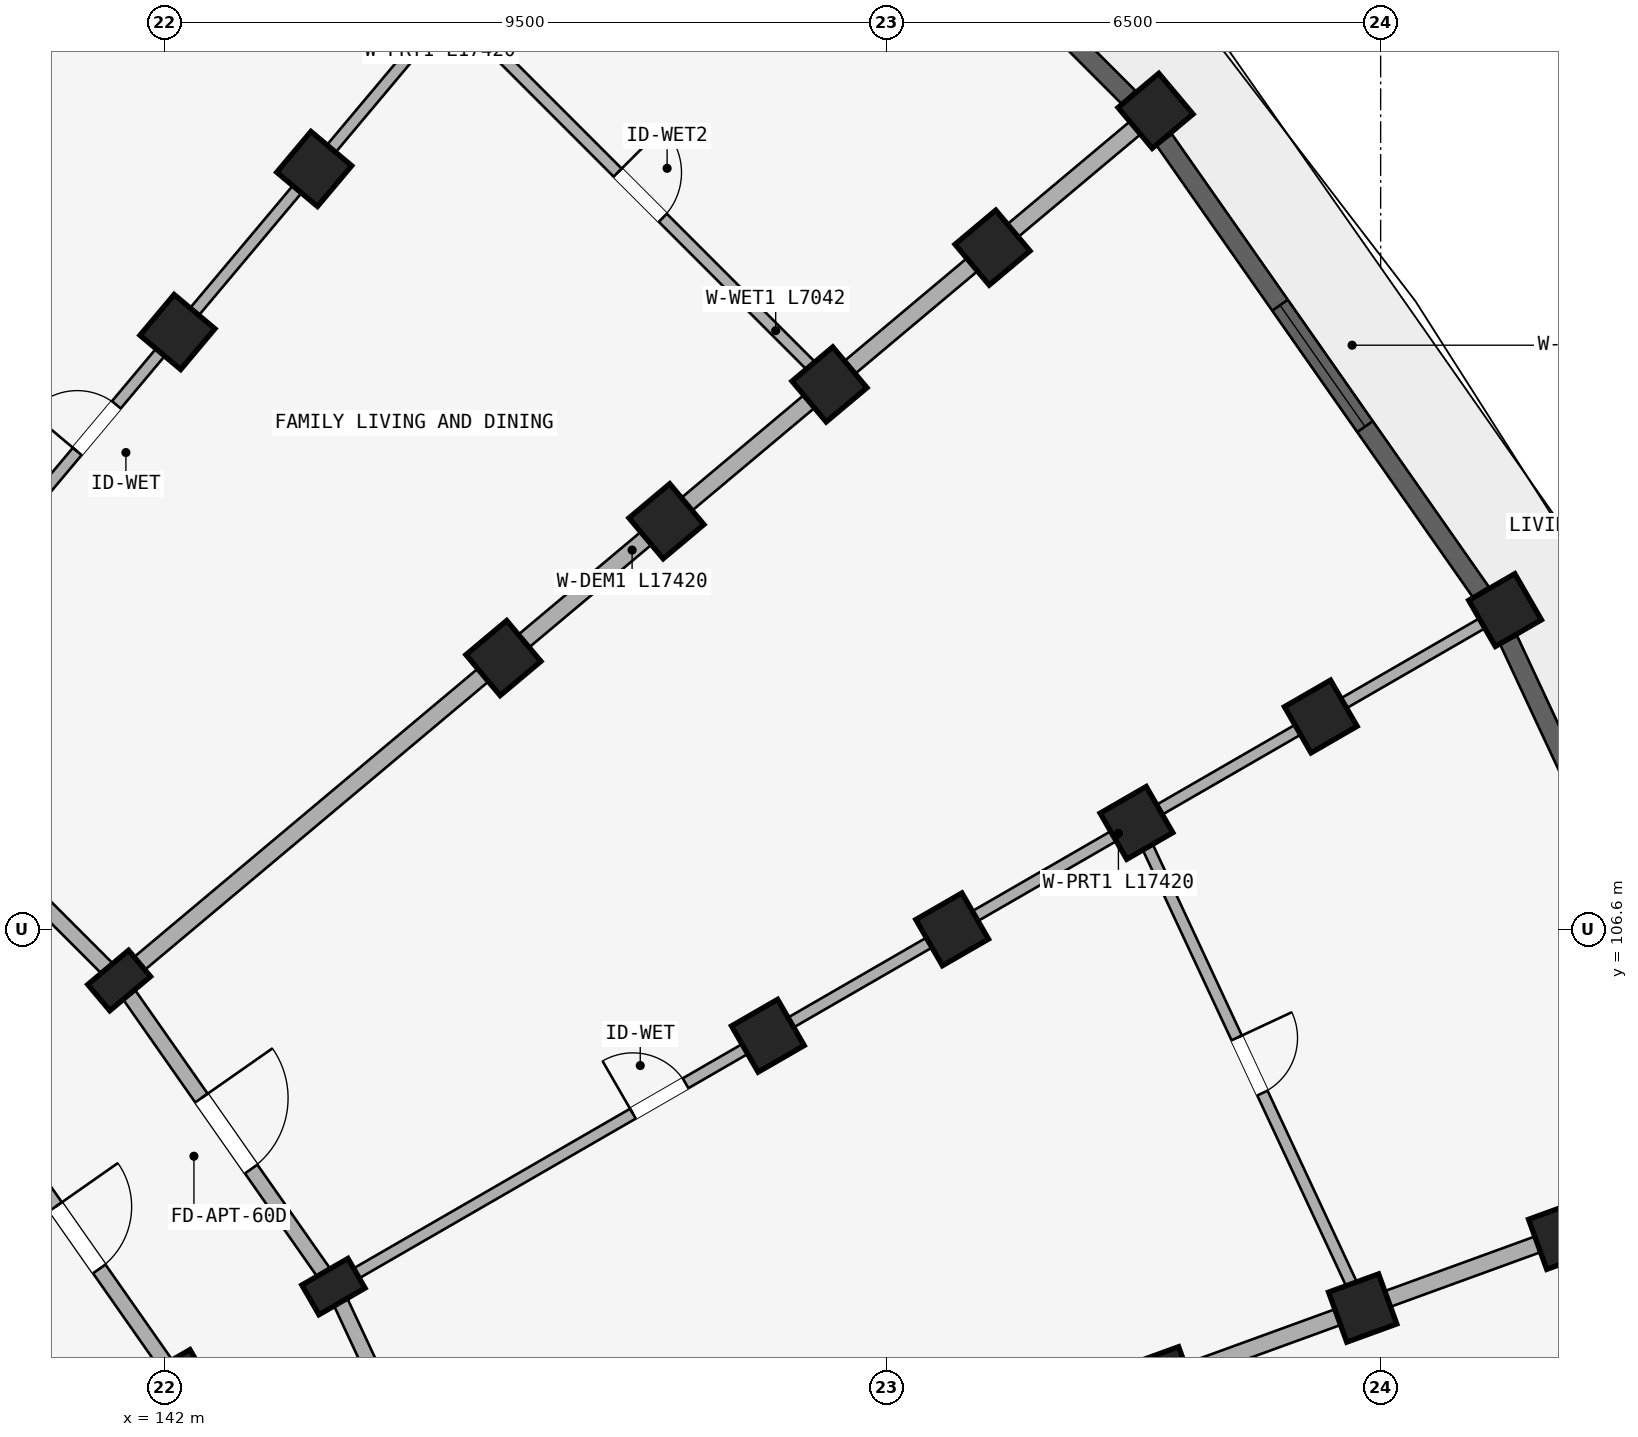
"""IFC4 building model, lengths in metres.
Left out: names, types, materials, properties, quantities, classifications, styles, units other than length and angle.
Written with IfcOpenShell. Run it as: python <this file> out.ifc"""

import sys

from ifc_helpers import new_model, si_unit, direction, frame, frame_2d, origin, origin_2d, place, context, subcontext, project, spatial, rectangle, extrude, element, fill, save


model = new_model("IFC4")
c1 = context("Model", 3, precision=1e-05, world=origin(), true_north=direction((0.0, 1.0)))
c2 = subcontext(c1, "Body", "Model", "MODEL_VIEW")
j1 = project(units=[si_unit("LENGTHUNIT", "METRE"), si_unit("PLANEANGLEUNIT", "RADIAN")], contexts=[c1])
p1 = place(None, origin())
s1 = spatial("IfcSite", under=j1, at=p1, CompositionType="ELEMENT")
p2 = place(p1, origin())
s2 = spatial("IfcBuilding", under=s1, at=p2, CompositionType="ELEMENT")
p3 = place(p2, frame((0.0, 0.0, 21.3)))
s3 = spatial("IfcBuildingStorey", under=s2, at=p3, CompositionType="ELEMENT", Elevation=21.3)
for number, where, z_axis, x_axis in (
    (1, (142.169, 114.458, 0.0), (0.0, 0.0, 1.0), (-0.766, 0.643, 0.0)),
    (2, (143.969, 116.603, 0.0), (0.0, 0.0, 1.0), (-0.766, 0.643, 0.0)),
):
    element("IfcColumn", number, at=place(p3, frame(where, z_axis=z_axis, x_axis=x_axis)), inside=s3, PredefinedType="COLUMN", context=c2, shape_type="SweptSolid", body=[
        extrude(rectangle(XDim=0.7, YDim=0.7, at=origin_2d()), origin(), (0.0, 0.0, 1.0), 2.93),
    ])
p4 = place(p3, frame((141.402, 105.927, 0.0), z_axis=(0.0, 0.0, 1.0), x_axis=(-0.642787609687, 0.766044443119, 0.0)))
e3 = element("IfcColumn", 3, at=p4, inside=s3, PredefinedType="COLUMN", context=c2, shape_type="SweptSolid", body=[
    extrude(rectangle(XDim=0.45, YDim=0.7, at=origin_2d()), origin(), (0.0, 0.0, 1.0), 2.93),
])
for number, where, z_axis, x_axis in (
    (4, (146.458, 110.169, 0.0), (0.0, 0.0, 1.0), (-0.643, 0.766, 0.0)),
    (5, (148.603, 111.969, 0.0), (0.0, 0.0, 1.0), (-0.643, 0.766, 0.0)),
    (6, (150.748, 113.769, 0.0), (0.0, 0.0, 1.0), (-0.643, 0.766, 0.0)),
    (7, (152.893, 115.568, 0.0), (0.0, 0.0, 1.0), (-0.643, 0.766, 0.0)),
    (8, (155.038, 117.368, 0.0), (0.0, 0.0, 1.0), (-0.643, 0.766, 0.0)),
):
    element("IfcColumn", number, at=place(p3, frame(where, z_axis=z_axis, x_axis=x_axis)), inside=s3, PredefinedType="COLUMN", context=c2, shape_type="SweptSolid", body=[
        extrude(rectangle(XDim=0.7, YDim=0.7, at=origin_2d()), origin(), (0.0, 0.0, 1.0), 2.93),
    ])
for number, where, z_axis, x_axis in (
    (9, (142.144, 100.7, 0.0), (0.0, 0.0, 1.0), (-0.5, 0.866, 0.0)),
    (10, (144.222, 101.9, 0.0), (0.0, 0.0, 1.0), (-0.5, 0.866, 0.0)),
):
    element("IfcColumn", number, at=place(p3, frame(where, z_axis=z_axis, x_axis=x_axis)), inside=s3, PredefinedType="COLUMN", context=c2, shape_type="SweptSolid", body=[
        extrude(rectangle(XDim=0.45, YDim=0.7, at=origin_2d()), origin(), (0.0, 0.0, 1.0), 2.93),
    ])
for number, where, z_axis, x_axis in (
    (11, (149.938, 105.2, 0.0), (0.0, 0.0, 1.0), (-0.5, 0.866, 0.0)),
    (12, (152.363, 106.6, 0.0), (0.0, 0.0, 1.0), (-0.5, 0.866, 0.0)),
    (13, (154.787, 108.0, 0.0), (0.0, 0.0, 1.0), (-0.5, 0.866, 0.0)),
    (14, (157.212, 109.4, 0.0), (0.0, 0.0, 1.0), (-0.5, 0.866, 0.0)),
    (15, (159.637, 110.8, 0.0), (0.0, 0.0, 1.0), (-0.5, 0.866, 0.0)),
    (16, (155.132, 100.66, 0.0), (0.0, 0.0, 1.0), (-0.342, 0.94, 0.0)),
    (17, (157.764, 101.618, 0.0), (0.0, 0.0, 1.0), (-0.342, 0.94, 0.0)),
    (18, (160.395, 102.575, 0.0), (0.0, 0.0, 1.0), (-0.342, 0.94, 0.0)),
):
    element("IfcColumn", number, at=place(p3, frame(where, z_axis=z_axis, x_axis=x_axis)), inside=s3, PredefinedType="COLUMN", context=c2, shape_type="SweptSolid", body=[
        extrude(rectangle(XDim=0.7, YDim=0.7, at=origin_2d()), origin(), (0.0, 0.0, 1.0), 2.93),
    ])
p5 = place(p3, frame((137.927, 109.402, 0.0), z_axis=(0.0, 0.0, 1.0), x_axis=(0.707106781187, -0.707106781187, 0.0)))
e19 = element("IfcWall", 19, at=p5, inside=s3, PredefinedType="STANDARD", context=c2, shape_type="SweptSolid", body=[
    extrude(rectangle(XDim=4.916, YDim=0.2, at=frame_2d((2.458, 0.0))), origin(), (0.0, 0.0, 1.0), 2.372),
])
p6 = place(p3, frame((139.564, 104.384, 0.0), z_axis=(0.0, 0.0, 1.0), x_axis=(0.573571637217, -0.819155404658, 0.0)))
e20 = element("IfcWall", 20, at=p6, inside=s3, PredefinedType="STANDARD", context=c2, shape_type="SweptSolid", body=[
    extrude(rectangle(XDim=4.497, YDim=0.2, at=frame_2d((2.249, 0.0))), origin(), (0.0, 0.0, 1.0), 2.372),
])
p7 = place(p6, frame((1.749, 0.0, 0.0)))
e21 = element("IfcOpeningElement", 21, at=p7, cuts=e20, PredefinedType="OPENING", context=c2, shape_type="SweptSolid", body=[
    extrude(rectangle(XDim=1.0, YDim=2.15, at=frame_2d((0.5, 1.075))), frame((0.0, 0.11, 0.0), z_axis=(0.0, -1.0, 0.0), x_axis=(1.0, 0.0, 0.0)), (0.0, 0.0, 1.0), 0.22),
])
p8 = place(p3, frame((141.402, 105.927, 0.0), z_axis=(0.0, 0.0, 1.0), x_axis=(0.573592335331, -0.819140911474, 0.0)))
e22 = element("IfcWall", 22, at=p8, inside=s3, PredefinedType="STANDARD", context=c2, shape_type="SweptSolid", body=[
    extrude(rectangle(XDim=4.916, YDim=0.2, at=frame_2d((2.458, 0.0))), origin(), (0.0, 0.0, 1.0), 2.372),
])
p9 = place(p8, frame((1.888, 0.0, 0.0)))
e23 = element("IfcOpeningElement", 23, at=p9, cuts=e22, PredefinedType="OPENING", context=c2, shape_type="SweptSolid", body=[
    extrude(rectangle(XDim=1.14, YDim=2.15, at=frame_2d((0.57, 1.075))), frame((0.0, 0.11, 0.0), z_axis=(0.0, -1.0, 0.0), x_axis=(1.0, 0.0, 0.0)), (0.0, 0.0, 1.0), 0.22),
])
p10 = place(p3, frame((144.222, 101.9, 0.0), z_axis=(0.0, 0.0, 1.0), x_axis=(0.422629854778, -0.906302381024, 0.0)))
e24 = element("IfcWall", 24, at=p10, inside=s3, PredefinedType="STANDARD", context=c2, shape_type="SweptSolid", body=[
    extrude(rectangle(XDim=4.915, YDim=0.2, at=frame_2d((2.458, 0.0))), origin(), (0.0, 0.0, 1.0), 2.372),
])
p11 = place(p3, frame((133.95, 112.309, 0.0), z_axis=(0.0, 0.0, 1.0), x_axis=(0.499997843263, 0.866026648973, 0.0)))
e25 = element("IfcWall", 25, at=p11, inside=s3, PredefinedType="STANDARD", context=c2, shape_type="SweptSolid", body=[
    extrude(rectangle(XDim=17.42, YDim=0.22, at=frame_2d((8.71, 0.0))), origin(), (0.0, 0.0, 1.0), 2.372),
])
p12 = place(p3, frame((137.991, 109.479, 0.0), z_axis=(0.0, 0.0, 1.0), x_axis=(0.642784757967, 0.766046835987, 0.0)))
e26 = element("IfcWall", 26, at=p12, inside=s3, PredefinedType="PARTITIONING", context=c2, shape_type="SweptSolid", body=[
    extrude(rectangle(XDim=17.42, YDim=0.15, at=frame_2d((8.71, 0.0))), origin(), (0.0, 0.0, 1.0), 2.372),
])
p13 = place(p12, frame((4.45, 0.0, 0.0)))
e27 = element("IfcOpeningElement", 27, at=p13, cuts=e26, PredefinedType="OPENING", context=c2, shape_type="SweptSolid", body=[
    extrude(rectangle(XDim=0.8, YDim=2.1, at=frame_2d((0.4, 1.05))), frame((0.0, 0.085, 0.0), z_axis=(0.0, -1.0, 0.0), x_axis=(1.0, 0.0, 0.0)), (0.0, 0.0, 1.0), 0.17),
])
p14 = place(p3, frame((141.479, 105.991, 0.0), z_axis=(0.0, 0.0, 1.0), x_axis=(0.766046835987, 0.642784757967, 0.0)))
e28 = element("IfcWall", 28, at=p14, inside=s3, PredefinedType="STANDARD", context=c2, shape_type="SweptSolid", body=[
    extrude(rectangle(XDim=17.42, YDim=0.22, at=frame_2d((8.71, 0.0))), origin(), (0.0, 0.0, 1.0), 2.372),
])
p15 = place(p3, frame((144.309, 101.95, 0.0), z_axis=(0.0, 0.0, 1.0), x_axis=(0.866026648973, 0.499997843263, 0.0)))
e29 = element("IfcWall", 29, at=p15, inside=s3, PredefinedType="PARTITIONING", context=c2, shape_type="SweptSolid", body=[
    extrude(rectangle(XDim=17.42, YDim=0.15, at=frame_2d((8.71, 0.0))), origin(), (0.0, 0.0, 1.0), 2.372),
])
p16 = place(p15, frame((4.45, 0.0, 0.0)))
e30 = element("IfcOpeningElement", 30, at=p16, cuts=e29, PredefinedType="OPENING", context=c2, shape_type="SweptSolid", body=[
    extrude(rectangle(XDim=0.8, YDim=2.1, at=frame_2d((0.4, 1.05))), frame((0.0, 0.085, 0.0), z_axis=(0.0, -1.0, 0.0), x_axis=(1.0, 0.0, 0.0)), (0.0, 0.0, 1.0), 0.17),
])
p17 = place(p3, frame((146.393, 97.479, 0.0), z_axis=(0.0, 0.0, 1.0), x_axis=(0.939691901159, 0.342022120477, 0.0)))
e31 = element("IfcWall", 31, at=p17, inside=s3, PredefinedType="STANDARD", context=c2, shape_type="SweptSolid", body=[
    extrude(rectangle(XDim=17.42, YDim=0.22, at=frame_2d((8.71, 0.0))), origin(), (0.0, 0.0, 1.0), 2.372),
])
p18 = place(p3, frame((145.769, 118.748, 0.0), z_axis=(0.0, 0.0, 1.0), x_axis=(0.707106781187, -0.707106781187, 0.0)))
e32 = element("IfcWall", 32, at=p18, inside=s3, PredefinedType="PLUMBINGWALL", context=c2, shape_type="SweptSolid", body=[
    extrude(rectangle(XDim=7.042, YDim=0.15, at=frame_2d((3.521, 0.0))), origin(), (0.0, 0.0, 1.0), 2.372),
])
p19 = place(p18, frame((3.101, 0.0, 0.0)))
e33 = element("IfcOpeningElement", 33, at=p19, cuts=e32, PredefinedType="OPENING", context=c2, shape_type="SweptSolid", body=[
    extrude(rectangle(XDim=0.84, YDim=2.1, at=frame_2d((0.42, 1.05))), frame((0.0, 0.085, 0.0), z_axis=(0.0, -1.0, 0.0), x_axis=(1.0, 0.0, 0.0)), (0.0, 0.0, 1.0), 0.17),
])
p20 = place(p3, frame((154.787, 108.0, 0.0), z_axis=(0.0, 0.0, 1.0), x_axis=(0.422640621205, -0.906297360311, 0.0)))
e34 = element("IfcWall", 34, at=p20, inside=s3, PredefinedType="PLUMBINGWALL", context=c2, shape_type="SweptSolid", body=[
    extrude(rectangle(XDim=7.042, YDim=0.15, at=frame_2d((3.521, 0.0))), origin(), (0.0, 0.0, 1.0), 2.372),
])
p21 = place(p20, frame((3.121, 0.0, 0.0)))
e35 = element("IfcOpeningElement", 35, at=p21, cuts=e34, PredefinedType="OPENING", context=c2, shape_type="SweptSolid", body=[
    extrude(rectangle(XDim=0.8, YDim=2.1, at=frame_2d((0.4, 1.05))), frame((0.0, 0.085, 0.0), z_axis=(0.0, -1.0, 0.0), x_axis=(1.0, 0.0, 0.0)), (0.0, 0.0, 1.0), 0.17),
])
p22 = place(p3, frame((149.546, 122.684, 0.0), z_axis=(0.0, 0.0, 1.0), x_axis=(0.707106781187, -0.707106781187, 0.0)))
e36 = element("IfcWall", 36, at=p22, inside=s3, PredefinedType="STANDARD", context=c2, shape_type="SweptSolid", body=[
    extrude(rectangle(XDim=7.267, YDim=0.25, at=frame_2d((3.633, 0.0))), origin(), (0.0, 0.0, 1.0), 2.472),
])
p23 = place(p22, frame((4.766, 0.0, 0.472)))
e37 = element("IfcOpeningElement", 37, at=p23, cuts=e36, PredefinedType="OPENING", context=c2, shape_type="SweptSolid", body=[
    extrude(rectangle(XDim=1.2, YDim=1.5, at=frame_2d((0.6, 0.75))), frame((0.0, 0.135, 0.0), z_axis=(0.0, -1.0, 0.0), x_axis=(1.0, 0.0, 0.0)), (0.0, 0.0, 1.0), 0.27),
])
p24 = place(p22, frame((1.883, 0.0, 0.0)))
e38 = element("IfcOpeningElement", 38, at=p24, cuts=e36, PredefinedType="OPENING", context=c2, shape_type="SweptSolid", body=[
    extrude(rectangle(XDim=1.32, YDim=2.15, at=frame_2d((0.66, 1.075))), frame((0.0, 0.135, 0.0), z_axis=(0.0, -1.0, 0.0), x_axis=(1.0, 0.0, 0.0)), (0.0, 0.0, 1.0), 0.27),
])
p25 = place(p3, frame((155.151, 116.989, 0.0), z_axis=(0.0, 0.0, 1.0), x_axis=(0.573566061701, -0.819159308599, 0.0)))
e39 = element("IfcWall", 39, at=p25, inside=s3, PredefinedType="STANDARD", context=c2, shape_type="SweptSolid", body=[
    extrude(rectangle(XDim=7.267, YDim=0.25, at=frame_2d((3.633, 0.0))), origin(), (0.0, 0.0, 1.0), 2.472),
])
p26 = place(p25, frame((2.658, 0.0, 0.422)))
e40 = element("IfcOpeningElement", 40, at=p26, cuts=e39, PredefinedType="OPENING", context=c2, shape_type="SweptSolid", body=[
    extrude(rectangle(XDim=1.95, YDim=1.85, at=frame_2d((0.975, 0.925))), frame((0.0, 0.135, 0.0), z_axis=(0.0, -1.0, 0.0), x_axis=(1.0, 0.0, 0.0)), (0.0, 0.0, 1.0), 0.27),
])
p27 = place(p3, frame((159.683, 110.406, 0.0), z_axis=(0.0, 0.0, 1.0), x_axis=(0.422627946127, -0.90630327107, 0.0)))
e41 = element("IfcWall", 41, at=p27, inside=s3, PredefinedType="STANDARD", context=c2, shape_type="SweptSolid", body=[
    extrude(rectangle(XDim=7.267, YDim=0.25, at=frame_2d((3.633, 0.0))), origin(), (0.0, 0.0, 1.0), 2.472),
])
p28 = place(p27, frame((2.733, 0.0, 0.622)))
e42 = element("IfcOpeningElement", 42, at=p28, cuts=e41, PredefinedType="OPENING", context=c2, shape_type="SweptSolid", body=[
    extrude(rectangle(XDim=1.8, YDim=1.65, at=frame_2d((0.9, 0.825))), frame((0.0, 0.135, 0.0), z_axis=(0.0, -1.0, 0.0), x_axis=(1.0, 0.0, 0.0)), (0.0, 0.0, 1.0), 0.27),
])
p29 = place(p26, origin())
e43 = element("IfcWindow", 43, at=p29, inside=s3, PartitioningType="DOUBLE_PANEL_VERTICAL", PredefinedType="WINDOW", context=c2, shape_type="SweptSolid", body=[
    extrude(rectangle(XDim=1.95, YDim=1.85, at=frame_2d((0.975, 0.925))), frame((0.0, 0.03, 0.0), z_axis=(0.0, -1.0, 0.0), x_axis=(1.0, 0.0, 0.0)), (0.0, 0.0, 1.0), 0.06),
])
fill(e40, e43)
p30 = place(p13, origin())
e44 = element("IfcDoor", 44, at=p30, inside=s3, OperationType="SINGLE_SWING_LEFT", PredefinedType="DOOR", context=c2, shape_type="SweptSolid", body=[
    extrude(rectangle(XDim=0.8, YDim=2.1, at=frame_2d((0.4, 1.05))), frame((0.0, 0.025, 0.0), z_axis=(0.0, -1.0, 0.0), x_axis=(1.0, 0.0, 0.0)), (0.0, 0.0, 1.0), 0.05),
])
fill(e27, e44)
p31 = place(p16, frame((0.8, 0.0, 0.0), z_axis=(0.0, 0.0, 1.0), x_axis=(-1.0, 0.0, 0.0)))
e45 = element("IfcDoor", 45, at=p31, inside=s3, OperationType="SINGLE_SWING_RIGHT", PredefinedType="DOOR", context=c2, shape_type="SweptSolid", body=[
    extrude(rectangle(XDim=0.8, YDim=2.1, at=frame_2d((0.4, 1.05))), frame((0.0, 0.025, 0.0), z_axis=(0.0, -1.0, 0.0), x_axis=(1.0, 0.0, 0.0)), (0.0, 0.0, 1.0), 0.05),
])
fill(e30, e45)
p32 = place(p19, frame((0.84, 0.0, 0.0), z_axis=(0.0, 0.0, 1.0), x_axis=(-1.0, 0.0, 0.0)))
e46 = element("IfcDoor", 46, at=p32, inside=s3, OperationType="SINGLE_SWING_RIGHT", PredefinedType="DOOR", context=c2, shape_type="SweptSolid", body=[
    extrude(rectangle(XDim=0.84, YDim=2.1, at=frame_2d((0.42, 1.05))), frame((0.0, 0.025, 0.0), z_axis=(0.0, -1.0, 0.0), x_axis=(1.0, 0.0, 0.0)), (0.0, 0.0, 1.0), 0.05),
])
fill(e33, e46)
p33 = place(p9, origin())
e47 = element("IfcDoor", 47, at=p33, inside=s3, OperationType="SINGLE_SWING_LEFT", PredefinedType="DOOR", context=c2, shape_type="SweptSolid", body=[
    extrude(rectangle(XDim=1.14, YDim=2.15, at=frame_2d((0.57, 1.075))), frame((0.0, 0.025, 0.0), z_axis=(0.0, -1.0, 0.0), x_axis=(1.0, 0.0, 0.0)), (0.0, 0.0, 1.0), 0.05),
])
fill(e23, e47)
p34 = place(p21, frame((0.8, 0.0, 0.0), z_axis=(0.0, 0.0, 1.0), x_axis=(-1.0, 0.0, 0.0)))
e48 = element("IfcDoor", 48, at=p34, inside=s3, OperationType="SINGLE_SWING_RIGHT", PredefinedType="DOOR", context=c2, shape_type="SweptSolid", body=[
    extrude(rectangle(XDim=0.8, YDim=2.1, at=frame_2d((0.4, 1.05))), frame((0.0, 0.025, 0.0), z_axis=(0.0, -1.0, 0.0), x_axis=(1.0, 0.0, 0.0)), (0.0, 0.0, 1.0), 0.05),
])
fill(e35, e48)
p35 = place(p7, origin())
e49 = element("IfcDoor", 49, at=p35, inside=s3, OperationType="SINGLE_SWING_LEFT", PredefinedType="DOOR", context=c2, shape_type="SweptSolid", body=[
    extrude(rectangle(XDim=1.0, YDim=2.15, at=frame_2d((0.5, 1.075))), frame((0.0, 0.025, 0.0), z_axis=(0.0, -1.0, 0.0), x_axis=(1.0, 0.0, 0.0)), (0.0, 0.0, 1.0), 0.05),
])
fill(e21, e49)
save(model, sys.argv[1])
